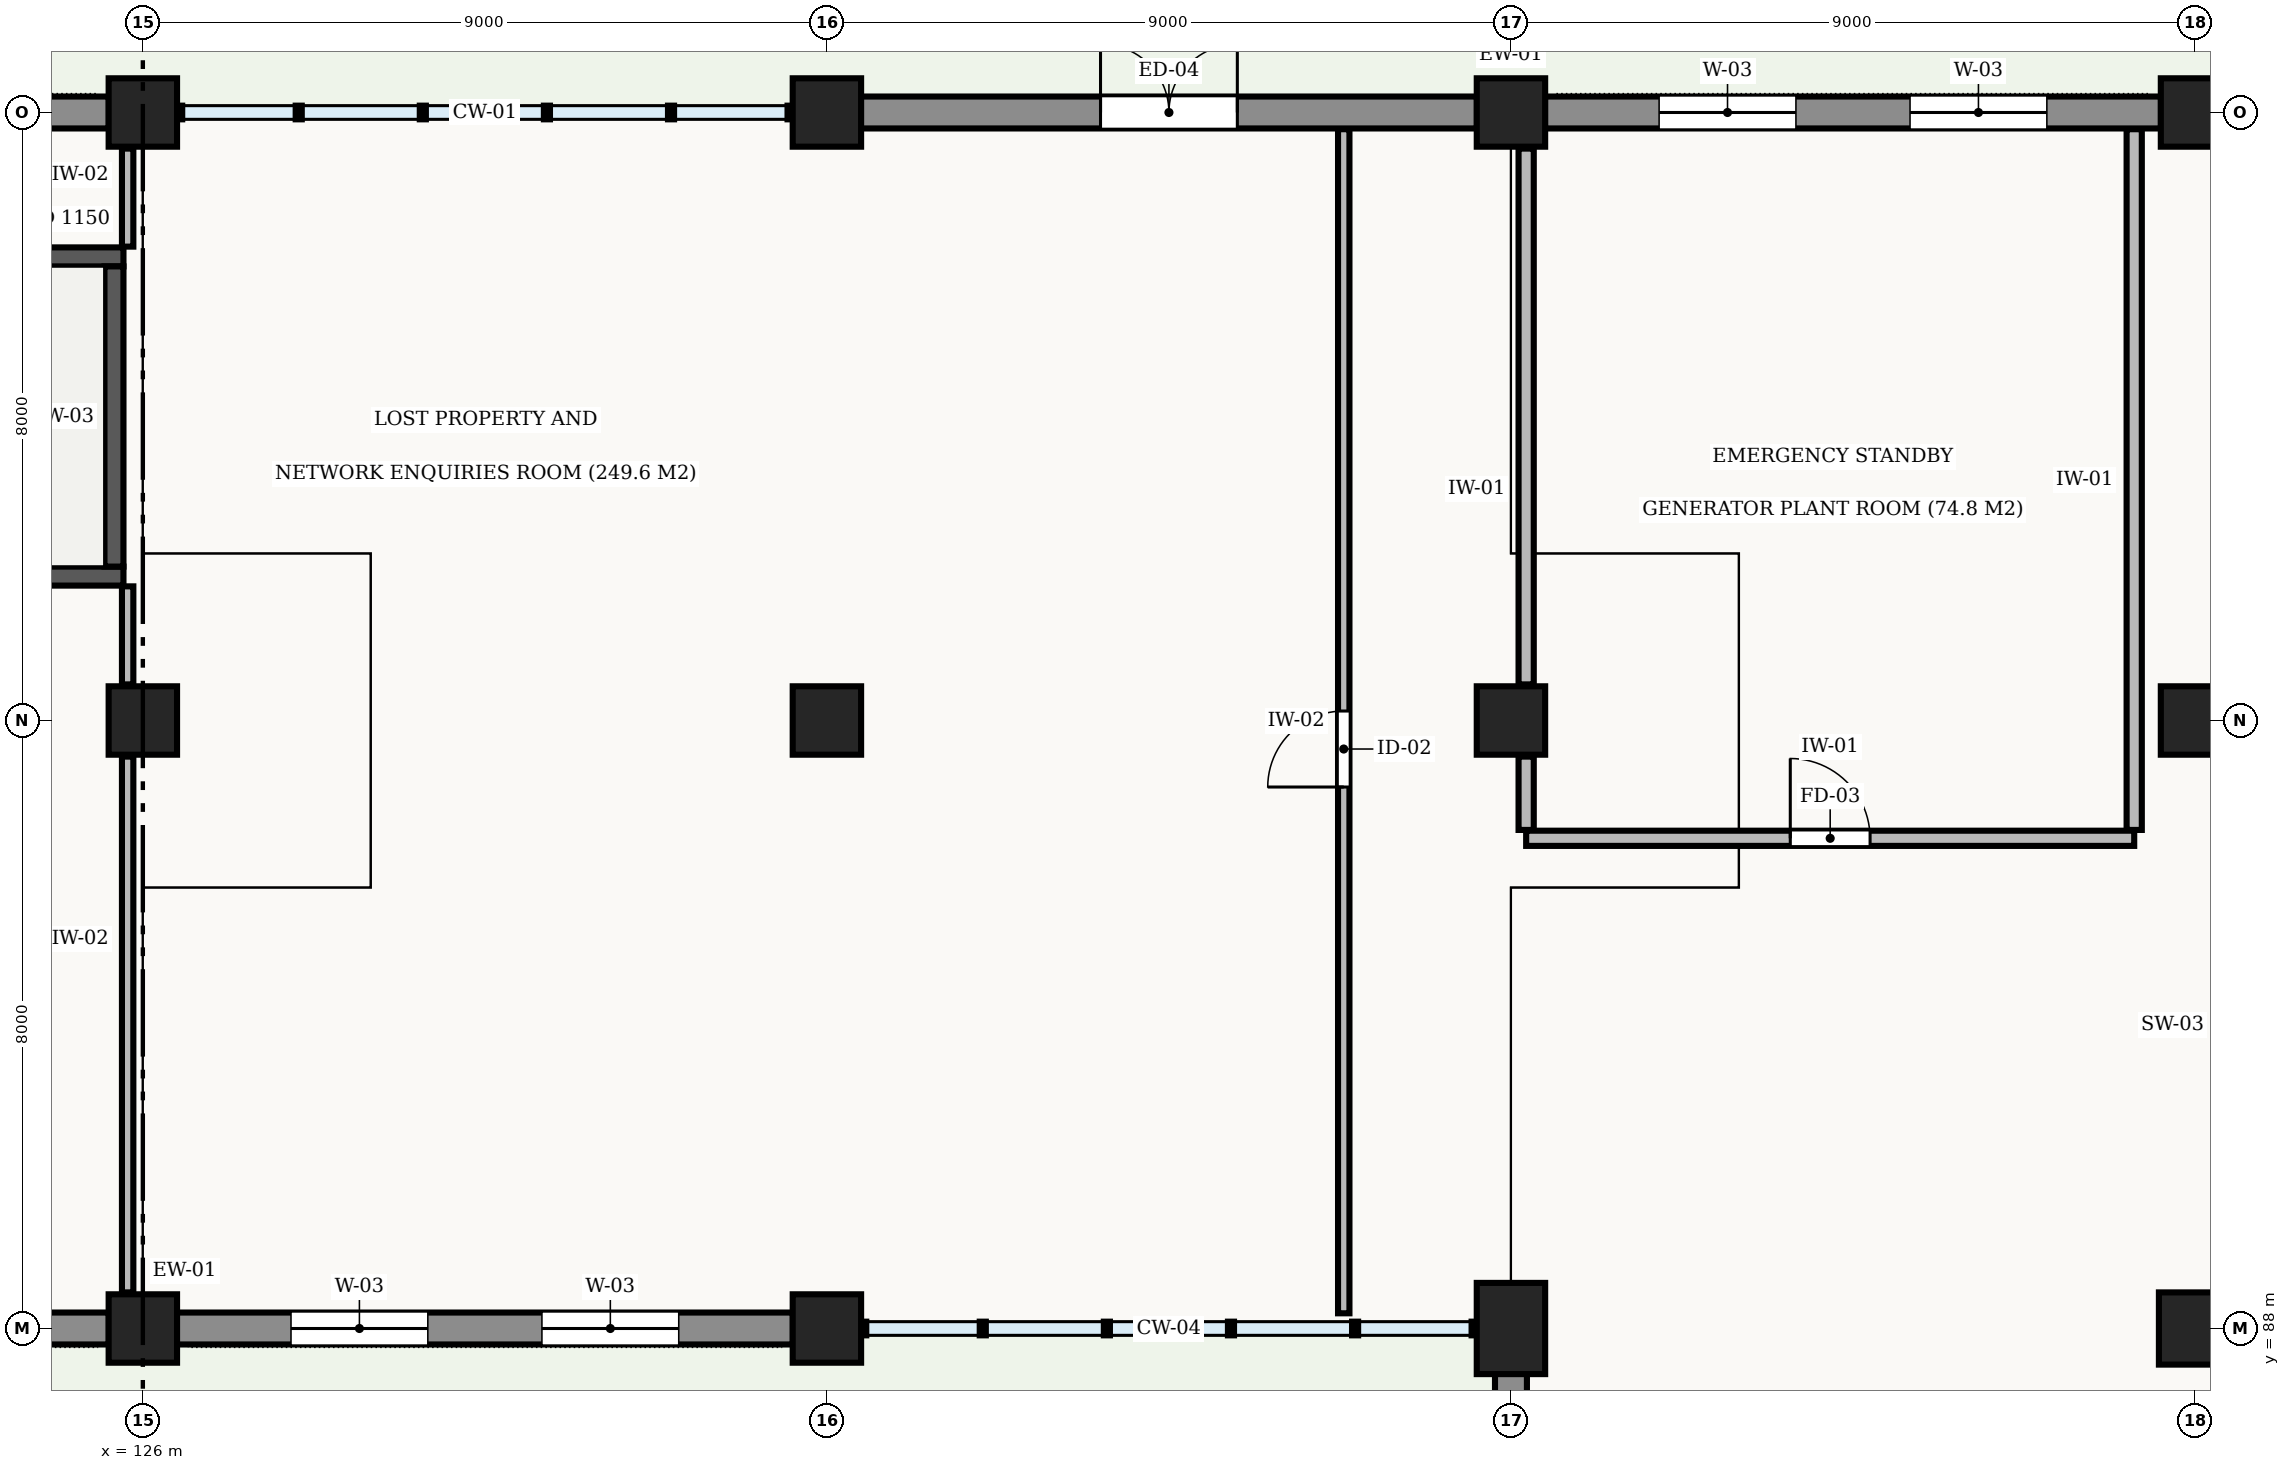
"""IFC4 building model, lengths in metres.
Left out: names, types, materials, properties, quantities, classifications, styles, units other than length and angle.
Written with IfcOpenShell. Run it as: python <this file> out.ifc"""

import sys

from ifc_helpers import new_model, si_unit, direction, frame, frame_2d, origin, origin_2d, place, context, subcontext, project, spatial, rectangle, extrude, element, fill, save


model = new_model("IFC4")
c1 = context("Model", 3, precision=1e-05, world=origin(), true_north=direction((0.0, 1.0)))
c2 = subcontext(c1, "Body", "Model", "MODEL_VIEW")
j1 = project(units=[si_unit("LENGTHUNIT", "METRE"), si_unit("PLANEANGLEUNIT", "RADIAN")], contexts=[c1])
p1 = place(None, origin())
s1 = spatial("IfcSite", under=j1, at=p1, CompositionType="ELEMENT")
p2 = place(p1, origin())
s2 = spatial("IfcBuilding", under=s1, at=p2, CompositionType="ELEMENT")
p3 = place(p2, origin())
s3 = spatial("IfcBuildingStorey", under=s2, at=p3, CompositionType="ELEMENT", Elevation=0.0)
for number, where, z_axis, x_axis in (
    (1, (126.0, 88.0, -0.42), (0.0, 0.0, 1.0), (1.0, 0.0, 0.0)),
    (2, (126.0, 96.0, -0.42), (0.0, 0.0, 1.0), (1.0, 0.0, 0.0)),
    (3, (126.0, 104.0, -0.42), (0.0, 0.0, 1.0), (1.0, 0.0, 0.0)),
    (4, (135.0, 88.0, -0.42), (0.0, 0.0, 1.0), (1.0, 0.0, 0.0)),
    (5, (135.0, 96.0, -0.42), (0.0, 0.0, 1.0), (1.0, 0.0, 0.0)),
    (6, (135.0, 104.0, -0.42), (0.0, 0.0, 1.0), (1.0, 0.0, 0.0)),
):
    element("IfcColumn", number, at=place(p3, frame(where, z_axis=z_axis, x_axis=x_axis)), inside=s3, PredefinedType="COLUMN", context=c2, shape_type="SweptSolid", body=[
        extrude(rectangle(XDim=0.9, YDim=0.9, at=origin_2d()), origin(), (0.0, 0.0, 1.0), 5.82),
    ])
p4 = place(p3, frame((144.0, 88.0, -0.42), z_axis=(0.0, 0.0, 1.0), x_axis=(1.0, 0.0, 0.0)))
e7 = element("IfcColumn", 7, at=p4, inside=s3, PredefinedType="COLUMN", context=c2, shape_type="SweptSolid", body=[
    extrude(rectangle(XDim=0.9, YDim=1.2, at=origin_2d()), origin(), (0.0, 0.0, 1.0), 5.82),
])
for number, where, z_axis, x_axis in (
    (8, (144.0, 96.0, -0.42), (0.0, 0.0, 1.0), (1.0, 0.0, 0.0)),
    (9, (144.0, 104.0, -0.42), (0.0, 0.0, 1.0), (1.0, 0.0, 0.0)),
):
    element("IfcColumn", number, at=place(p3, frame(where, z_axis=z_axis, x_axis=x_axis)), inside=s3, PredefinedType="COLUMN", context=c2, shape_type="SweptSolid", body=[
        extrude(rectangle(XDim=0.9, YDim=0.9, at=origin_2d()), origin(), (0.0, 0.0, 1.0), 5.82),
    ])
p5 = place(p3, frame((153.0, 88.0, -0.42), z_axis=(0.0, 0.0, 1.0), x_axis=(1.0, 0.0, 0.0)))
e10 = element("IfcColumn", 10, at=p5, inside=s3, PredefinedType="COLUMN", context=c2, shape_type="SweptSolid", body=[
    extrude(rectangle(XDim=0.95, YDim=0.95, at=origin_2d()), origin(), (0.0, 0.0, 1.0), 5.82),
])
for number, where, z_axis, x_axis in (
    (11, (153.0, 96.0, -0.42), (0.0, 0.0, 1.0), (1.0, 0.0, 0.0)),
    (12, (153.0, 104.0, -0.42), (0.0, 0.0, 1.0), (1.0, 0.0, 0.0)),
):
    element("IfcColumn", number, at=place(p3, frame(where, z_axis=z_axis, x_axis=x_axis)), inside=s3, PredefinedType="COLUMN", context=c2, shape_type="SweptSolid", body=[
        extrude(rectangle(XDim=0.9, YDim=0.9, at=origin_2d()), origin(), (0.0, 0.0, 1.0), 5.82),
    ])
p6 = place(p3, frame((117.448, 104.0, 0.0), z_axis=(0.0, 0.0, 1.0), x_axis=(1.0, 0.0, 0.0)))
e13 = element("IfcWall", 13, at=p6, inside=s3, PredefinedType="STANDARD", context=c2, shape_type="SweptSolid", body=[
    extrude(rectangle(XDim=8.104, YDim=0.42, at=frame_2d((4.052, 0.0))), origin(), (0.0, 0.0, 1.0), 4.38),
])
p7 = place(p6, frame((1.801, 0.0, 0.9)))
e14 = element("IfcOpeningElement", 14, at=p7, cuts=e13, PredefinedType="OPENING", context=c2, shape_type="SweptSolid", body=[
    extrude(rectangle(XDim=1.35, YDim=2.0, at=frame_2d((0.675, 1.0))), frame((0.0, 0.222, 0.0), z_axis=(0.0, -1.0, 0.0), x_axis=(1.0, 0.0, 0.0)), (0.0, 0.0, 1.0), 0.444),
])
p8 = place(p6, frame((4.953, 0.0, 0.9)))
e15 = element("IfcOpeningElement", 15, at=p8, cuts=e13, PredefinedType="OPENING", context=c2, shape_type="SweptSolid", body=[
    extrude(rectangle(XDim=1.35, YDim=2.0, at=frame_2d((0.675, 1.0))), frame((0.0, 0.222, 0.0), z_axis=(0.0, -1.0, 0.0), x_axis=(1.0, 0.0, 0.0)), (0.0, 0.0, 1.0), 0.444),
])
p9 = place(p3, frame((135.448, 104.0, 0.0), z_axis=(0.0, 0.0, 1.0), x_axis=(1.0, 0.0, 0.0)))
e16 = element("IfcWall", 16, at=p9, inside=s3, PredefinedType="STANDARD", context=c2, shape_type="SweptSolid", body=[
    extrude(rectangle(XDim=8.104, YDim=0.42, at=frame_2d((4.052, 0.0))), origin(), (0.0, 0.0, 1.0), 4.38),
])
p10 = place(p9, frame((3.152, 0.0, 0.0)))
e17 = element("IfcOpeningElement", 17, at=p10, cuts=e16, PredefinedType="OPENING", context=c2, shape_type="SweptSolid", body=[
    extrude(rectangle(XDim=1.8, YDim=2.4, at=frame_2d((0.9, 1.2))), frame((0.0, 0.222, 0.0), z_axis=(0.0, -1.0, 0.0), x_axis=(1.0, 0.0, 0.0)), (0.0, 0.0, 1.0), 0.444),
])
p11 = place(p3, frame((144.448, 104.0, 0.0), z_axis=(0.0, 0.0, 1.0), x_axis=(1.0, 0.0, 0.0)))
e18 = element("IfcWall", 18, at=p11, inside=s3, PredefinedType="STANDARD", context=c2, shape_type="SweptSolid", body=[
    extrude(rectangle(XDim=8.104, YDim=0.42, at=frame_2d((4.052, 0.0))), origin(), (0.0, 0.0, 1.0), 4.38),
])
p12 = place(p11, frame((1.501, 0.0, 0.9)))
e19 = element("IfcOpeningElement", 19, at=p12, cuts=e18, PredefinedType="OPENING", context=c2, shape_type="SweptSolid", body=[
    extrude(rectangle(XDim=1.8, YDim=2.4, at=frame_2d((0.9, 1.2))), frame((0.0, 0.222, 0.0), z_axis=(0.0, -1.0, 0.0), x_axis=(1.0, 0.0, 0.0)), (0.0, 0.0, 1.0), 0.444),
])
p13 = place(p11, frame((4.803, 0.0, 0.9)))
e20 = element("IfcOpeningElement", 20, at=p13, cuts=e18, PredefinedType="OPENING", context=c2, shape_type="SweptSolid", body=[
    extrude(rectangle(XDim=1.8, YDim=2.4, at=frame_2d((0.9, 1.2))), frame((0.0, 0.222, 0.0), z_axis=(0.0, -1.0, 0.0), x_axis=(1.0, 0.0, 0.0)), (0.0, 0.0, 1.0), 0.444),
])
p14 = place(p3, frame((144.0, 80.598, 0.0), z_axis=(0.0, 0.0, 1.0), x_axis=(0.0, 1.0, 0.0)))
e21 = element("IfcWall", 21, at=p14, inside=s3, PredefinedType="STANDARD", context=c2, shape_type="SweptSolid", body=[
    extrude(rectangle(XDim=6.804, YDim=0.42, at=frame_2d((3.402, 0.0))), origin(), (0.0, 0.0, 1.0), 4.38),
])
p15 = place(p14, frame((1.068, 0.0, 0.9)))
e22 = element("IfcOpeningElement", 22, at=p15, cuts=e21, PredefinedType="OPENING", context=c2, shape_type="SweptSolid", body=[
    extrude(rectangle(XDim=1.8, YDim=2.4, at=frame_2d((0.9, 1.2))), frame((0.0, 0.222, 0.0), z_axis=(0.0, -1.0, 0.0), x_axis=(1.0, 0.0, 0.0)), (0.0, 0.0, 1.0), 0.444),
])
p16 = place(p14, frame((3.936, 0.0, 0.9)))
e23 = element("IfcOpeningElement", 23, at=p16, cuts=e21, PredefinedType="OPENING", context=c2, shape_type="SweptSolid", body=[
    extrude(rectangle(XDim=1.8, YDim=2.4, at=frame_2d((0.9, 1.2))), frame((0.0, 0.222, 0.0), z_axis=(0.0, -1.0, 0.0), x_axis=(1.0, 0.0, 0.0)), (0.0, 0.0, 1.0), 0.444),
])
p17 = place(p3, frame((134.552, 88.0, 0.0), z_axis=(0.0, 0.0, 1.0), x_axis=(-1.0, 0.0, 0.0)))
e24 = element("IfcWall", 24, at=p17, inside=s3, PredefinedType="STANDARD", context=c2, shape_type="SweptSolid", body=[
    extrude(rectangle(XDim=8.104, YDim=0.42, at=frame_2d((4.052, 0.0))), origin(), (0.0, 0.0, 1.0), 4.38),
])
p18 = place(p17, frame((1.501, 0.0, 0.9)))
e25 = element("IfcOpeningElement", 25, at=p18, cuts=e24, PredefinedType="OPENING", context=c2, shape_type="SweptSolid", body=[
    extrude(rectangle(XDim=1.8, YDim=2.4, at=frame_2d((0.9, 1.2))), frame((0.0, 0.222, 0.0), z_axis=(0.0, -1.0, 0.0), x_axis=(1.0, 0.0, 0.0)), (0.0, 0.0, 1.0), 0.444),
])
p19 = place(p17, frame((4.803, 0.0, 0.9)))
e26 = element("IfcOpeningElement", 26, at=p19, cuts=e24, PredefinedType="OPENING", context=c2, shape_type="SweptSolid", body=[
    extrude(rectangle(XDim=1.8, YDim=2.4, at=frame_2d((0.9, 1.2))), frame((0.0, 0.222, 0.0), z_axis=(0.0, -1.0, 0.0), x_axis=(1.0, 0.0, 0.0)), (0.0, 0.0, 1.0), 0.444),
])
p20 = place(p3, frame((125.552, 88.0, 0.0), z_axis=(0.0, 0.0, 1.0), x_axis=(-1.0, 0.0, 0.0)))
e27 = element("IfcWall", 27, at=p20, inside=s3, PredefinedType="STANDARD", context=c2, shape_type="SweptSolid", body=[
    extrude(rectangle(XDim=8.104, YDim=0.42, at=frame_2d((4.052, 0.0))), origin(), (0.0, 0.0, 1.0), 4.38),
])
p21 = place(p20, frame((1.801, 0.0, 0.9)))
e28 = element("IfcOpeningElement", 28, at=p21, cuts=e27, PredefinedType="OPENING", context=c2, shape_type="SweptSolid", body=[
    extrude(rectangle(XDim=1.35, YDim=2.0, at=frame_2d((0.675, 1.0))), frame((0.0, 0.222, 0.0), z_axis=(0.0, -1.0, 0.0), x_axis=(1.0, 0.0, 0.0)), (0.0, 0.0, 1.0), 0.444),
])
p22 = place(p20, frame((4.953, 0.0, 0.9)))
e29 = element("IfcOpeningElement", 29, at=p22, cuts=e27, PredefinedType="OPENING", context=c2, shape_type="SweptSolid", body=[
    extrude(rectangle(XDim=1.35, YDim=2.0, at=frame_2d((0.675, 1.0))), frame((0.0, 0.222, 0.0), z_axis=(0.0, -1.0, 0.0), x_axis=(1.0, 0.0, 0.0)), (0.0, 0.0, 1.0), 0.444),
])
p23 = place(p3, frame((117.255, 97.9, 0.0), z_axis=(0.0, 0.0, 1.0), x_axis=(1.0, 0.0, 0.0)))
e30 = element("IfcWall", 30, at=p23, inside=s3, PredefinedType="SHEAR", context=c2, shape_type="SweptSolid", body=[
    extrude(rectangle(XDim=8.49, YDim=0.25, at=frame_2d((4.245, 0.0))), origin(), (0.0, 0.0, 1.0), 5.05),
])
p24 = place(p23, frame((0.405, 0.0, 0.0)))
e31 = element("IfcOpeningElement", 31, at=p24, cuts=e30, PredefinedType="OPENING", context=c2, shape_type="SweptSolid", body=[
    extrude(rectangle(XDim=1.25, YDim=2.15, at=frame_2d((0.625, 1.075))), frame((0.0, 0.137, 0.0), z_axis=(0.0, -1.0, 0.0), x_axis=(1.0, 0.0, 0.0)), (0.0, 0.0, 1.0), 0.274),
])
p25 = place(p3, frame((125.745, 102.1, 0.0), z_axis=(0.0, 0.0, 1.0), x_axis=(-1.0, 0.0, 0.0)))
e32 = element("IfcWall", 32, at=p25, inside=s3, PredefinedType="SHEAR", context=c2, shape_type="SweptSolid", body=[
    extrude(rectangle(XDim=8.49, YDim=0.25, at=frame_2d((4.245, 0.0))), origin(), (0.0, 0.0, 1.0), 5.05),
])
p26 = place(p3, frame((125.62, 98.025, 0.0), z_axis=(0.0, 0.0, 1.0), x_axis=(0.0, 1.0, 0.0)))
e33 = element("IfcWall", 33, at=p26, inside=s3, PredefinedType="SHEAR", context=c2, shape_type="SweptSolid", body=[
    extrude(rectangle(XDim=3.95, YDim=0.25, at=frame_2d((1.975, 0.0))), origin(), (0.0, 0.0, 1.0), 5.05),
])
p27 = place(p3, frame((125.8, 88.475, 0.0), z_axis=(0.0, 0.0, 1.0), x_axis=(0.0, 1.0, 0.0)))
e34 = element("IfcWall", 34, at=p27, inside=s3, PredefinedType="STANDARD", context=c2, shape_type="SweptSolid", body=[
    extrude(rectangle(XDim=7.05, YDim=0.15, at=frame_2d((3.525, 0.0))), origin(), (0.0, 0.0, 1.0), 4.33),
])
for number, where, z_axis, x_axis in (
    (35, (125.8, 96.475, 0.0), (0.0, 0.0, 1.0), (0.0, 1.0, 0.0)),
    (36, (125.8, 102.235, 0.0), (0.0, 0.0, 1.0), (0.0, 1.0, 0.0)),
):
    element("IfcWall", number, at=place(p3, frame(where, z_axis=z_axis, x_axis=x_axis)), inside=s3, PredefinedType="STANDARD", context=c2, shape_type="SweptSolid", body=[
        extrude(rectangle(XDim=1.29, YDim=0.15, at=frame_2d((0.645, 0.0))), origin(), (0.0, 0.0, 1.0), 4.23),
    ])
p28 = place(p3, frame((141.8, 88.2, 0.0), z_axis=(0.0, 0.0, 1.0), x_axis=(0.0, 1.0, 0.0)))
e37 = element("IfcWall", 37, at=p28, inside=s3, PredefinedType="STANDARD", context=c2, shape_type="SweptSolid", body=[
    extrude(rectangle(XDim=15.58, YDim=0.15, at=frame_2d((7.79, 0.0))), origin(), (0.0, 0.0, 1.0), 5.05),
])
p29 = place(p28, frame((6.925, 0.0, 0.0)))
e38 = element("IfcOpeningElement", 38, at=p29, cuts=e37, PredefinedType="OPENING", context=c2, shape_type="SweptSolid", body=[
    extrude(rectangle(XDim=1.0, YDim=2.1, at=frame_2d((0.5, 1.05))), frame((0.0, 0.087, 0.0), z_axis=(0.0, -1.0, 0.0), x_axis=(1.0, 0.0, 0.0)), (0.0, 0.0, 1.0), 0.174),
])
p30 = place(p3, frame((144.2, 94.45, 0.0), z_axis=(0.0, 0.0, 1.0), x_axis=(1.0, 0.0, 0.0)))
e39 = element("IfcWall", 39, at=p30, inside=s3, PredefinedType="STANDARD", context=c2, shape_type="SweptSolid", body=[
    extrude(rectangle(XDim=8.0, YDim=0.2, at=frame_2d((4.0, 0.0))), origin(), (0.0, 0.0, 1.0), 5.05),
])
p31 = place(p30, frame((3.475, 0.0, 0.0)))
e40 = element("IfcOpeningElement", 40, at=p31, cuts=e39, PredefinedType="OPENING", context=c2, shape_type="SweptSolid", body=[
    extrude(rectangle(XDim=1.05, YDim=2.15, at=frame_2d((0.525, 1.075))), frame((0.0, 0.112, 0.0), z_axis=(0.0, -1.0, 0.0), x_axis=(1.0, 0.0, 0.0)), (0.0, 0.0, 1.0), 0.224),
])
p32 = place(p3, frame((144.2, 94.56, 0.0), z_axis=(0.0, 0.0, 1.0), x_axis=(0.0, 1.0, 0.0)))
e41 = element("IfcWall", 41, at=p32, inside=s3, PredefinedType="STANDARD", context=c2, shape_type="SweptSolid", body=[
    extrude(rectangle(XDim=0.965, YDim=0.2, at=frame_2d((0.482, 0.0))), origin(), (0.0, 0.0, 1.0), 4.33),
])
p33 = place(p3, frame((144.2, 96.475, 0.0), z_axis=(0.0, 0.0, 1.0), x_axis=(0.0, 1.0, 0.0)))
e42 = element("IfcWall", 42, at=p33, inside=s3, PredefinedType="STANDARD", context=c2, shape_type="SweptSolid", body=[
    extrude(rectangle(XDim=7.05, YDim=0.2, at=frame_2d((3.525, 0.0))), origin(), (0.0, 0.0, 1.0), 4.23),
])
p34 = place(p3, frame((152.2, 94.56, 0.0), z_axis=(0.0, 0.0, 1.0), x_axis=(0.0, 1.0, 0.0)))
e43 = element("IfcWall", 43, at=p34, inside=s3, PredefinedType="STANDARD", context=c2, shape_type="SweptSolid", body=[
    extrude(rectangle(XDim=9.22, YDim=0.2, at=frame_2d((4.61, 0.0))), origin(), (0.0, 0.0, 1.0), 5.05),
])
p35 = place(p10, origin())
e44 = element("IfcDoor", 44, at=p35, inside=s3, OperationType="SINGLE_SWING_LEFT", PredefinedType="DOOR", context=c2, shape_type="SweptSolid", body=[
    extrude(rectangle(XDim=1.8, YDim=2.4, at=frame_2d((0.9, 1.2))), frame((0.0, 0.025, 0.0), z_axis=(0.0, -1.0, 0.0), x_axis=(1.0, 0.0, 0.0)), (0.0, 0.0, 1.0), 0.05),
])
fill(e17, e44)
p36 = place(p12, origin())
e45 = element("IfcWindow", 45, at=p36, inside=s3, PartitioningType="SINGLE_PANEL", PredefinedType="WINDOW", context=c2, shape_type="SweptSolid", body=[
    extrude(rectangle(XDim=1.8, YDim=2.4, at=frame_2d((0.9, 1.2))), frame((0.0, 0.03, 0.0), z_axis=(0.0, -1.0, 0.0), x_axis=(1.0, 0.0, 0.0)), (0.0, 0.0, 1.0), 0.06),
])
fill(e19, e45)
p37 = place(p13, origin())
e46 = element("IfcWindow", 46, at=p37, inside=s3, PartitioningType="SINGLE_PANEL", PredefinedType="WINDOW", context=c2, shape_type="SweptSolid", body=[
    extrude(rectangle(XDim=1.8, YDim=2.4, at=frame_2d((0.9, 1.2))), frame((0.0, 0.03, 0.0), z_axis=(0.0, -1.0, 0.0), x_axis=(1.0, 0.0, 0.0)), (0.0, 0.0, 1.0), 0.06),
])
fill(e20, e46)
p38 = place(p18, origin())
e47 = element("IfcWindow", 47, at=p38, inside=s3, PartitioningType="SINGLE_PANEL", PredefinedType="WINDOW", context=c2, shape_type="SweptSolid", body=[
    extrude(rectangle(XDim=1.8, YDim=2.4, at=frame_2d((0.9, 1.2))), frame((0.0, 0.03, 0.0), z_axis=(0.0, -1.0, 0.0), x_axis=(1.0, 0.0, 0.0)), (0.0, 0.0, 1.0), 0.06),
])
fill(e25, e47)
p39 = place(p19, origin())
e48 = element("IfcWindow", 48, at=p39, inside=s3, PartitioningType="SINGLE_PANEL", PredefinedType="WINDOW", context=c2, shape_type="SweptSolid", body=[
    extrude(rectangle(XDim=1.8, YDim=2.4, at=frame_2d((0.9, 1.2))), frame((0.0, 0.03, 0.0), z_axis=(0.0, -1.0, 0.0), x_axis=(1.0, 0.0, 0.0)), (0.0, 0.0, 1.0), 0.06),
])
fill(e26, e48)
p40 = place(p29, origin())
e49 = element("IfcDoor", 49, at=p40, inside=s3, OperationType="SINGLE_SWING_LEFT", PredefinedType="DOOR", context=c2, shape_type="SweptSolid", body=[
    extrude(rectangle(XDim=1.0, YDim=2.1, at=frame_2d((0.5, 1.05))), frame((0.0, 0.025, 0.0), z_axis=(0.0, -1.0, 0.0), x_axis=(1.0, 0.0, 0.0)), (0.0, 0.0, 1.0), 0.05),
])
fill(e38, e49)
p41 = place(p31, origin())
e50 = element("IfcDoor", 50, at=p41, inside=s3, OperationType="SINGLE_SWING_LEFT", PredefinedType="DOOR", context=c2, shape_type="SweptSolid", body=[
    extrude(rectangle(XDim=1.05, YDim=2.15, at=frame_2d((0.525, 1.075))), frame((0.0, 0.025, 0.0), z_axis=(0.0, -1.0, 0.0), x_axis=(1.0, 0.0, 0.0)), (0.0, 0.0, 1.0), 0.05),
])
fill(e40, e50)
save(model, sys.argv[1])
